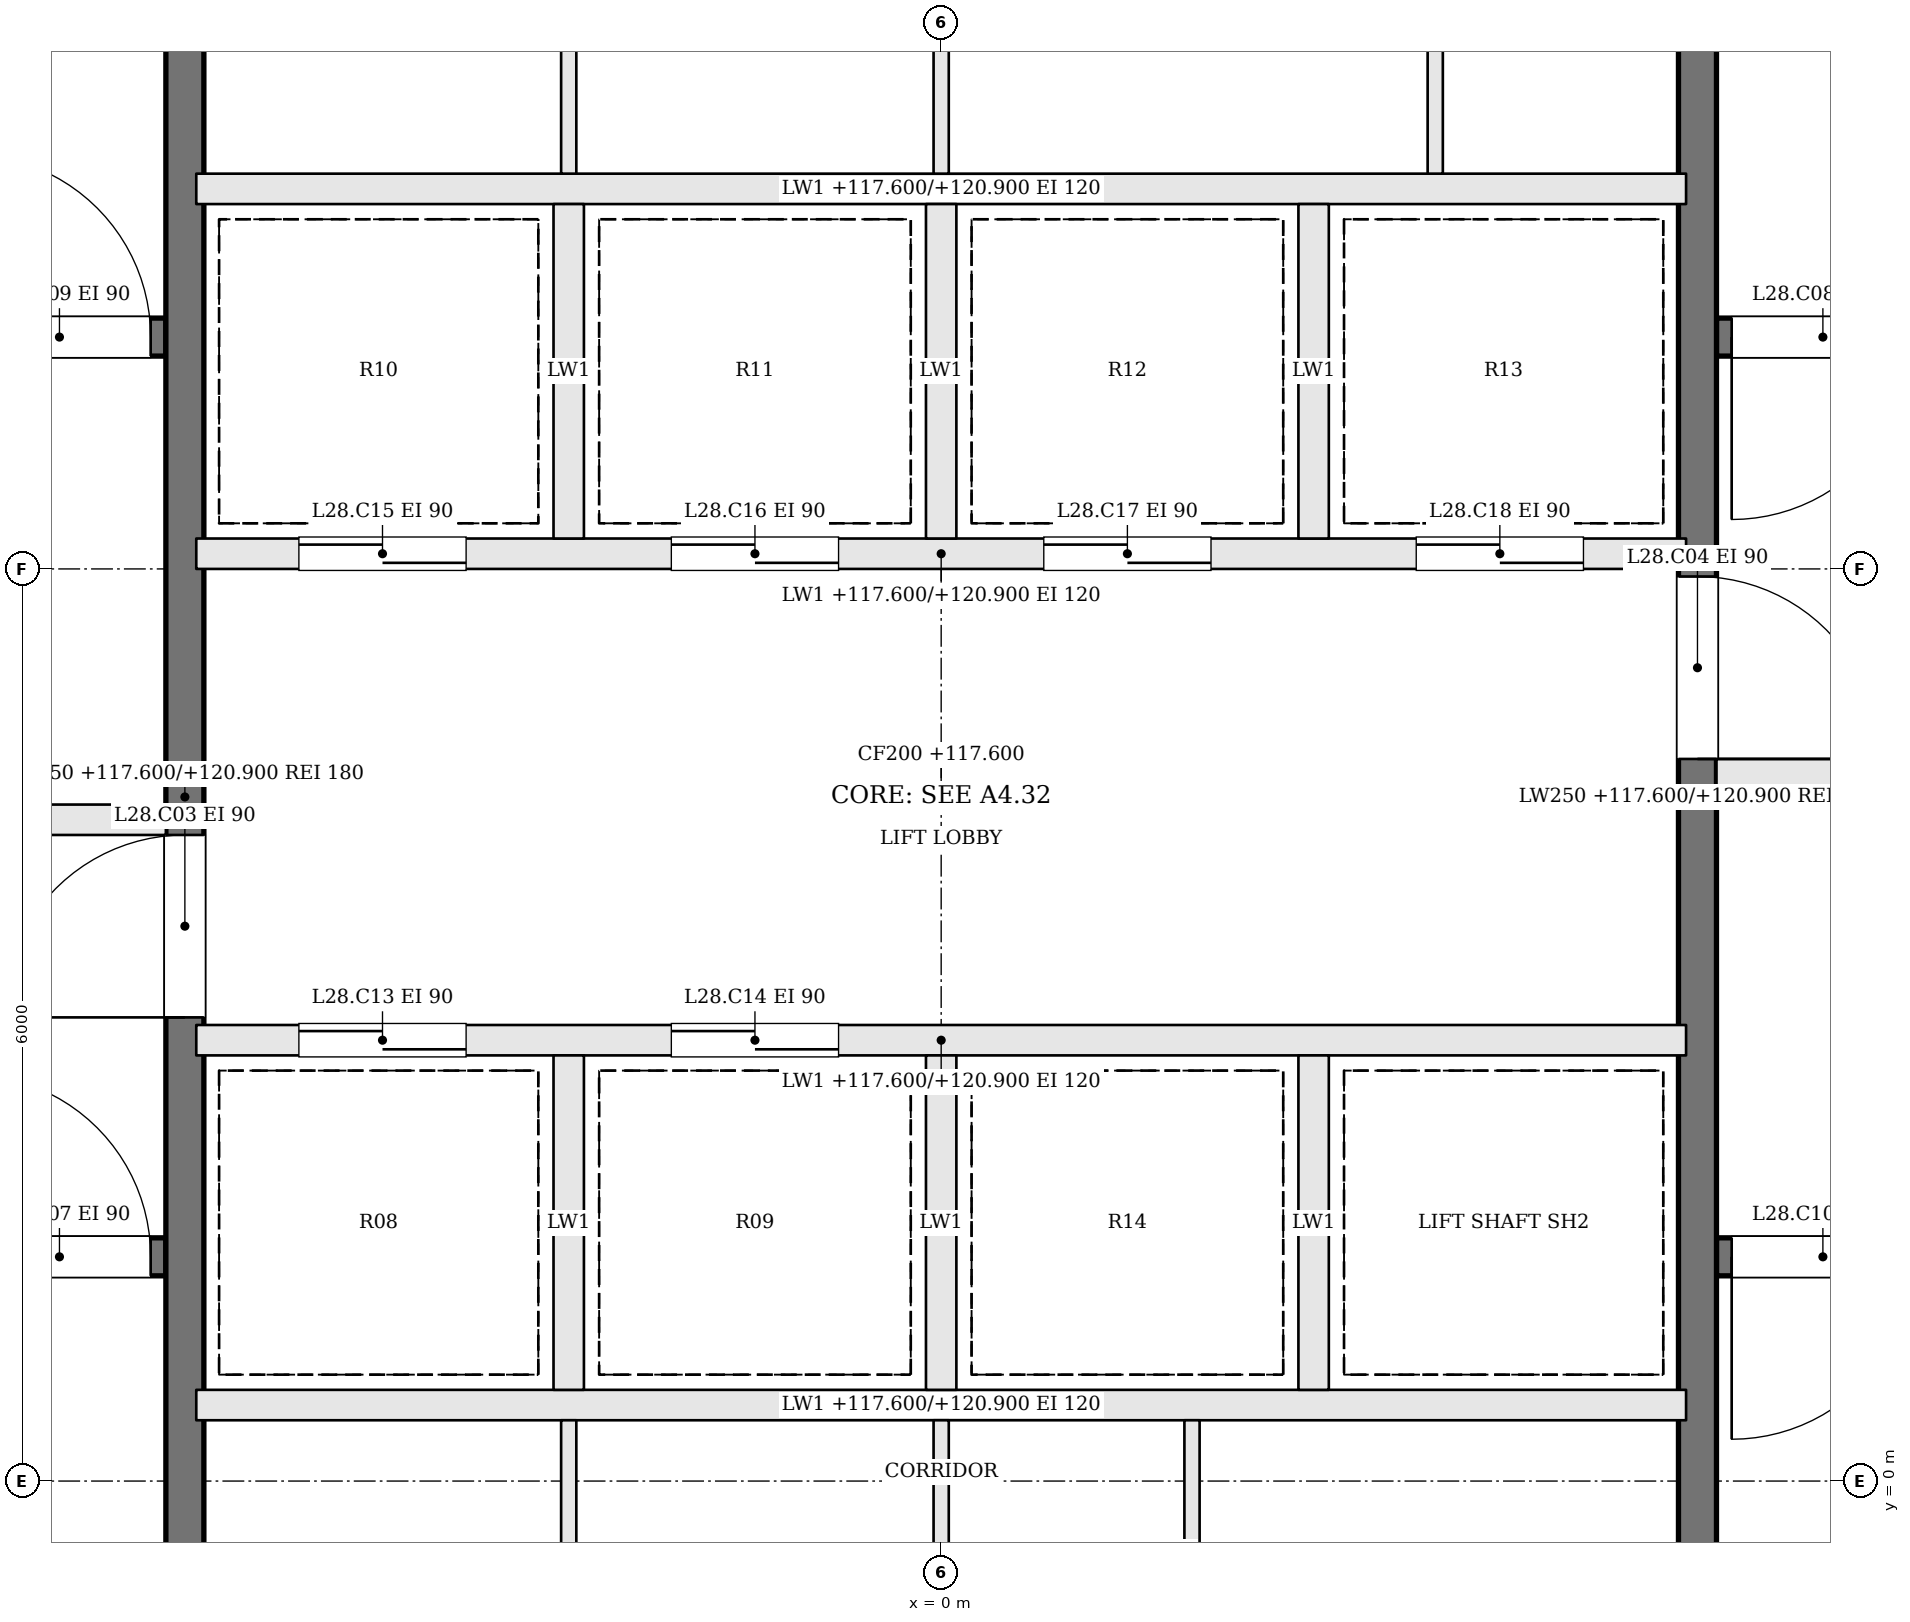
"""IFC4 building model, lengths in metres.
Left out: names, types, materials, properties, quantities, classifications, styles, units other than length and angle.
Written with IfcOpenShell. Run it as: python <this file> out.ifc"""

import sys

from ifc_helpers import new_model, si_unit, direction, frame, frame_2d, origin, place, context, subcontext, project, spatial, rectangle, extrude, element, fill, save


model = new_model("IFC4")
c1 = context("Model", 3, precision=1e-05, world=origin(), true_north=direction((0.0, 1.0)))
c2 = subcontext(c1, "Body", "Model", "MODEL_VIEW")
j1 = project(units=[si_unit("LENGTHUNIT", "METRE"), si_unit("PLANEANGLEUNIT", "RADIAN")], contexts=[c1])
p1 = place(None, origin())
s1 = spatial("IfcSite", under=j1, at=p1, CompositionType="ELEMENT")
p2 = place(p1, origin())
s2 = spatial("IfcBuilding", under=s1, at=p2, CompositionType="ELEMENT")
p3 = place(p2, frame((0.0, 0.0, 117.6)))
s3 = spatial("IfcBuildingStorey", under=s2, at=p3, CompositionType="ELEMENT", Elevation=117.6)
p4 = place(p3, frame((-11.9, 1.475, 0.0), z_axis=(0.0, 0.0, 1.0), x_axis=(1.0, 0.0, 0.0)))
e1 = element("IfcWall", 1, at=p4, inside=s3, PredefinedType="SOLIDWALL", context=c2, shape_type="SweptSolid", body=[
    extrude(rectangle(XDim=6.8, YDim=0.25, at=frame_2d((3.4, 0.0))), origin(), (0.0, 0.0, 1.0), 3.3),
])
p5 = place(p4, frame((5.5, 0.0, 0.0)))
e2 = element("IfcOpeningElement", 2, at=p5, cuts=e1, PredefinedType="OPENING", context=c2, shape_type="SweptSolid", body=[
    extrude(rectangle(XDim=1.2, YDim=2.1, at=frame_2d((0.6, 1.05))), frame((0.0, 0.135, 0.0), z_axis=(0.0, -1.0, 0.0), x_axis=(1.0, 0.0, 0.0)), (0.0, 0.0, 1.0), 0.27),
])
p6 = place(p3, frame((11.9, 7.525, 0.0), z_axis=(0.0, 0.0, 1.0), x_axis=(-1.0, 0.0, 0.0)))
e3 = element("IfcWall", 3, at=p6, inside=s3, PredefinedType="SOLIDWALL", context=c2, shape_type="SweptSolid", body=[
    extrude(rectangle(XDim=6.8, YDim=0.25, at=frame_2d((3.4, 0.0))), origin(), (0.0, 0.0, 1.0), 3.3),
])
p7 = place(p6, frame((5.5, 0.0, 0.0)))
e4 = element("IfcOpeningElement", 4, at=p7, cuts=e3, PredefinedType="OPENING", context=c2, shape_type="SweptSolid", body=[
    extrude(rectangle(XDim=1.2, YDim=2.1, at=frame_2d((0.6, 1.05))), frame((0.0, 0.135, 0.0), z_axis=(0.0, -1.0, 0.0), x_axis=(1.0, 0.0, 0.0)), (0.0, 0.0, 1.0), 0.27),
])
p8 = place(p3, frame((-11.9, 4.35, 0.0), z_axis=(0.0, 0.0, 1.0), x_axis=(1.0, 0.0, 0.0)))
e5 = element("IfcWall", 5, at=p8, inside=s3, PredefinedType="SOLIDWALL", context=c2, shape_type="SweptSolid", body=[
    extrude(rectangle(XDim=6.8, YDim=0.2, at=frame_2d((3.4, 0.0))), origin(), (0.0, 0.0, 1.0), 3.3),
])
p9 = place(p8, frame((4.1, 0.0, 0.0)))
e6 = element("IfcOpeningElement", 6, at=p9, cuts=e5, PredefinedType="OPENING", context=c2, shape_type="SweptSolid", body=[
    extrude(rectangle(XDim=1.2, YDim=2.1, at=frame_2d((0.6, 1.05))), frame((0.0, 0.11, 0.0), z_axis=(0.0, -1.0, 0.0), x_axis=(1.0, 0.0, 0.0)), (0.0, 0.0, 1.0), 0.22),
])
p10 = place(p8, frame((0.8, 0.0, 0.0)))
e7 = element("IfcOpeningElement", 7, at=p10, cuts=e5, PredefinedType="OPENING", context=c2, shape_type="SweptSolid", body=[
    extrude(rectangle(XDim=1.2, YDim=2.1, at=frame_2d((0.6, 1.05))), frame((0.0, 0.11, 0.0), z_axis=(0.0, -1.0, 0.0), x_axis=(1.0, 0.0, 0.0)), (0.0, 0.0, 1.0), 0.22),
])
p11 = place(p3, frame((11.9, 4.65, 0.0), z_axis=(0.0, 0.0, 1.0), x_axis=(-1.0, 0.0, 0.0)))
e8 = element("IfcWall", 8, at=p11, inside=s3, PredefinedType="SOLIDWALL", context=c2, shape_type="SweptSolid", body=[
    extrude(rectangle(XDim=6.8, YDim=0.2, at=frame_2d((3.4, 0.0))), origin(), (0.0, 0.0, 1.0), 3.3),
])
p12 = place(p11, frame((4.1, 0.0, 0.0)))
e9 = element("IfcOpeningElement", 9, at=p12, cuts=e8, PredefinedType="OPENING", context=c2, shape_type="SweptSolid", body=[
    extrude(rectangle(XDim=1.2, YDim=2.1, at=frame_2d((0.6, 1.05))), frame((0.0, 0.11, 0.0), z_axis=(0.0, -1.0, 0.0), x_axis=(1.0, 0.0, 0.0)), (0.0, 0.0, 1.0), 0.22),
])
p13 = place(p11, frame((0.8, 0.0, 0.0)))
e10 = element("IfcOpeningElement", 10, at=p13, cuts=e8, PredefinedType="OPENING", context=c2, shape_type="SweptSolid", body=[
    extrude(rectangle(XDim=1.2, YDim=2.1, at=frame_2d((0.6, 1.05))), frame((0.0, 0.11, 0.0), z_axis=(0.0, -1.0, 0.0), x_axis=(1.0, 0.0, 0.0)), (0.0, 0.0, 1.0), 0.22),
])
p14 = place(p3, frame((-11.9, 7.525, 0.0), z_axis=(0.0, 0.0, 1.0), x_axis=(1.0, 0.0, 0.0)))
e11 = element("IfcWall", 11, at=p14, inside=s3, PredefinedType="SOLIDWALL", context=c2, shape_type="SweptSolid", body=[
    extrude(rectangle(XDim=6.8, YDim=0.25, at=frame_2d((3.4, 0.0))), origin(), (0.0, 0.0, 1.0), 3.3),
])
p15 = place(p14, frame((5.5, 0.0, 0.0)))
e12 = element("IfcOpeningElement", 12, at=p15, cuts=e11, PredefinedType="OPENING", context=c2, shape_type="SweptSolid", body=[
    extrude(rectangle(XDim=1.2, YDim=2.1, at=frame_2d((0.6, 1.05))), frame((0.0, 0.135, 0.0), z_axis=(0.0, -1.0, 0.0), x_axis=(1.0, 0.0, 0.0)), (0.0, 0.0, 1.0), 0.27),
])
p16 = place(p3, frame((11.9, 1.475, 0.0), z_axis=(0.0, 0.0, 1.0), x_axis=(-1.0, 0.0, 0.0)))
e13 = element("IfcWall", 13, at=p16, inside=s3, PredefinedType="SOLIDWALL", context=c2, shape_type="SweptSolid", body=[
    extrude(rectangle(XDim=6.8, YDim=0.25, at=frame_2d((3.4, 0.0))), origin(), (0.0, 0.0, 1.0), 3.3),
])
p17 = place(p16, frame((5.5, 0.0, 0.0)))
e14 = element("IfcOpeningElement", 14, at=p17, cuts=e13, PredefinedType="OPENING", context=c2, shape_type="SweptSolid", body=[
    extrude(rectangle(XDim=1.2, YDim=2.1, at=frame_2d((0.6, 1.05))), frame((0.0, 0.135, 0.0), z_axis=(0.0, -1.0, 0.0), x_axis=(1.0, 0.0, 0.0)), (0.0, 0.0, 1.0), 0.27),
])
p18 = place(p3, frame((-4.975, -1.9, 0.0), z_axis=(0.0, 0.0, 1.0), x_axis=(0.0, 1.0, 0.0)))
e15 = element("IfcWall", 15, at=p18, inside=s3, PredefinedType="SOLIDWALL", context=c2, shape_type="SweptSolid", body=[
    extrude(rectangle(XDim=12.8, YDim=0.25, at=frame_2d((6.4, 0.0))), origin(), (0.0, 0.0, 1.0), 3.3),
])
p19 = place(p18, frame((4.95, 0.0, 0.0)))
e16 = element("IfcOpeningElement", 16, at=p19, cuts=e15, PredefinedType="OPENING", context=c2, shape_type="SweptSolid", body=[
    extrude(rectangle(XDim=1.2, YDim=2.1, at=frame_2d((0.6, 1.05))), frame((0.0, 0.135, 0.0), z_axis=(0.0, -1.0, 0.0), x_axis=(1.0, 0.0, 0.0)), (0.0, 0.0, 1.0), 0.27),
])
p20 = place(p3, frame((4.975, 10.9, 0.0), z_axis=(0.0, 0.0, 1.0), x_axis=(0.0, -1.0, 0.0)))
e17 = element("IfcWall", 17, at=p20, inside=s3, PredefinedType="SOLIDWALL", context=c2, shape_type="SweptSolid", body=[
    extrude(rectangle(XDim=12.8, YDim=0.25, at=frame_2d((6.4, 0.0))), origin(), (0.0, 0.0, 1.0), 3.3),
])
p21 = place(p20, frame((4.95, 0.0, 0.0)))
e18 = element("IfcOpeningElement", 18, at=p21, cuts=e17, PredefinedType="OPENING", context=c2, shape_type="SweptSolid", body=[
    extrude(rectangle(XDim=1.2, YDim=2.1, at=frame_2d((0.6, 1.05))), frame((0.0, 0.135, 0.0), z_axis=(0.0, -1.0, 0.0), x_axis=(1.0, 0.0, 0.0)), (0.0, 0.0, 1.0), 0.27),
])
p22 = place(p3, frame((-4.9, 0.5, 0.0), z_axis=(0.0, 0.0, 1.0), x_axis=(1.0, 0.0, 0.0)))
e19 = element("IfcWall", 19, at=p22, inside=s3, PredefinedType="SOLIDWALL", context=c2, shape_type="SweptSolid", body=[
    extrude(rectangle(XDim=9.8, YDim=0.2, at=frame_2d((4.9, 0.0))), origin(), (0.0, 0.0, 1.0), 3.3),
])
p23 = place(p3, frame((-4.9, 2.9, 0.0), z_axis=(0.0, 0.0, 1.0), x_axis=(1.0, 0.0, 0.0)))
e20 = element("IfcWall", 20, at=p23, inside=s3, PredefinedType="SOLIDWALL", context=c2, shape_type="SweptSolid", body=[
    extrude(rectangle(XDim=9.8, YDim=0.2, at=frame_2d((4.9, 0.0))), origin(), (0.0, 0.0, 1.0), 3.3),
])
p24 = place(p23, frame((0.675, 0.0, 0.0)))
e21 = element("IfcOpeningElement", 21, at=p24, cuts=e20, PredefinedType="OPENING", context=c2, shape_type="SweptSolid", body=[
    extrude(rectangle(XDim=1.1, YDim=2.1, at=frame_2d((0.55, 1.05))), frame((0.0, 0.11, 0.0), z_axis=(0.0, -1.0, 0.0), x_axis=(1.0, 0.0, 0.0)), (0.0, 0.0, 1.0), 0.22),
])
p25 = place(p23, frame((3.125, 0.0, 0.0)))
e22 = element("IfcOpeningElement", 22, at=p25, cuts=e20, PredefinedType="OPENING", context=c2, shape_type="SweptSolid", body=[
    extrude(rectangle(XDim=1.1, YDim=2.1, at=frame_2d((0.55, 1.05))), frame((0.0, 0.11, 0.0), z_axis=(0.0, -1.0, 0.0), x_axis=(1.0, 0.0, 0.0)), (0.0, 0.0, 1.0), 0.22),
])
p26 = place(p3, frame((-4.9, 6.1, 0.0), z_axis=(0.0, 0.0, 1.0), x_axis=(1.0, 0.0, 0.0)))
e23 = element("IfcWall", 23, at=p26, inside=s3, PredefinedType="SOLIDWALL", context=c2, shape_type="SweptSolid", body=[
    extrude(rectangle(XDim=9.8, YDim=0.2, at=frame_2d((4.9, 0.0))), origin(), (0.0, 0.0, 1.0), 3.3),
])
p27 = place(p26, frame((0.675, 0.0, 0.0)))
e24 = element("IfcOpeningElement", 24, at=p27, cuts=e23, PredefinedType="OPENING", context=c2, shape_type="SweptSolid", body=[
    extrude(rectangle(XDim=1.1, YDim=2.1, at=frame_2d((0.55, 1.05))), frame((0.0, 0.11, 0.0), z_axis=(0.0, -1.0, 0.0), x_axis=(1.0, 0.0, 0.0)), (0.0, 0.0, 1.0), 0.22),
])
p28 = place(p26, frame((3.125, 0.0, 0.0)))
e25 = element("IfcOpeningElement", 25, at=p28, cuts=e23, PredefinedType="OPENING", context=c2, shape_type="SweptSolid", body=[
    extrude(rectangle(XDim=1.1, YDim=2.1, at=frame_2d((0.55, 1.05))), frame((0.0, 0.11, 0.0), z_axis=(0.0, -1.0, 0.0), x_axis=(1.0, 0.0, 0.0)), (0.0, 0.0, 1.0), 0.22),
])
p29 = place(p26, frame((5.575, 0.0, 0.0)))
e26 = element("IfcOpeningElement", 26, at=p29, cuts=e23, PredefinedType="OPENING", context=c2, shape_type="SweptSolid", body=[
    extrude(rectangle(XDim=1.1, YDim=2.1, at=frame_2d((0.55, 1.05))), frame((0.0, 0.11, 0.0), z_axis=(0.0, -1.0, 0.0), x_axis=(1.0, 0.0, 0.0)), (0.0, 0.0, 1.0), 0.22),
])
p30 = place(p26, frame((8.025, 0.0, 0.0)))
e27 = element("IfcOpeningElement", 27, at=p30, cuts=e23, PredefinedType="OPENING", context=c2, shape_type="SweptSolid", body=[
    extrude(rectangle(XDim=1.1, YDim=2.1, at=frame_2d((0.55, 1.05))), frame((0.0, 0.11, 0.0), z_axis=(0.0, -1.0, 0.0), x_axis=(1.0, 0.0, 0.0)), (0.0, 0.0, 1.0), 0.22),
])
p31 = place(p3, frame((-4.9, 8.5, 0.0), z_axis=(0.0, 0.0, 1.0), x_axis=(1.0, 0.0, 0.0)))
e28 = element("IfcWall", 28, at=p31, inside=s3, PredefinedType="SOLIDWALL", context=c2, shape_type="SweptSolid", body=[
    extrude(rectangle(XDim=9.8, YDim=0.2, at=frame_2d((4.9, 0.0))), origin(), (0.0, 0.0, 1.0), 3.3),
])
for number, where, z_axis, x_axis in (
    (29, (-2.45, 0.6, 0.0), (0.0, 0.0, 1.0), (0.0, 1.0, 0.0)),
    (30, (0.0, 0.6, 0.0), (0.0, 0.0, 1.0), (0.0, 1.0, 0.0)),
    (31, (2.45, 0.6, 0.0), (0.0, 0.0, 1.0), (0.0, 1.0, 0.0)),
    (32, (-2.45, 6.2, 0.0), (0.0, 0.0, 1.0), (0.0, 1.0, 0.0)),
    (33, (0.0, 6.2, 0.0), (0.0, 0.0, 1.0), (0.0, 1.0, 0.0)),
    (34, (2.45, 6.2, 0.0), (0.0, 0.0, 1.0), (0.0, 1.0, 0.0)),
):
    element("IfcWall", number, at=place(p3, frame(where, z_axis=z_axis, x_axis=x_axis)), inside=s3, PredefinedType="SOLIDWALL", context=c2, shape_type="SweptSolid", body=[
        extrude(rectangle(XDim=2.2, YDim=0.2, at=frame_2d((1.1, 0.0))), origin(), (0.0, 0.0, 1.0), 3.3),
    ])
for number, where, z_axis, x_axis in (
    (35, (-2.45, -1.9, 0.0), (0.0, 0.0, 1.0), (0.0, 1.0, 0.0)),
    (36, (0.0, -1.9, 0.0), (0.0, 0.0, 1.0), (0.0, 1.0, 0.0)),
    (37, (1.65, -1.9, 0.0), (0.0, 0.0, 1.0), (0.0, 1.0, 0.0)),
    (38, (-2.45, 8.6, 0.0), (0.0, 0.0, 1.0), (0.0, 1.0, 0.0)),
    (39, (0.0, 8.6, 0.0), (0.0, 0.0, 1.0), (0.0, 1.0, 0.0)),
    (40, (3.25, 8.6, 0.0), (0.0, 0.0, 1.0), (0.0, 1.0, 0.0)),
):
    element("IfcWall", number, at=place(p3, frame(where, z_axis=z_axis, x_axis=x_axis)), inside=s3, PredefinedType="PARTITIONING", context=c2, shape_type="SweptSolid", body=[
        extrude(rectangle(XDim=2.3, YDim=0.1, at=frame_2d((1.15, 0.0))), origin(), (0.0, 0.0, 1.0), 3.3),
    ])
p32 = place(p19, origin())
e41 = element("IfcDoor", 41, at=p32, inside=s3, OperationType="SINGLE_SWING_LEFT", PredefinedType="DOOR", context=c2, shape_type="SweptSolid", body=[
    extrude(rectangle(XDim=1.2, YDim=2.1, at=frame_2d((0.6, 1.05))), frame((0.0, 0.025, 0.0), z_axis=(0.0, -1.0, 0.0), x_axis=(1.0, 0.0, 0.0)), (0.0, 0.0, 1.0), 0.05),
])
fill(e16, e41)
p33 = place(p21, origin())
e42 = element("IfcDoor", 42, at=p33, inside=s3, OperationType="SINGLE_SWING_RIGHT", PredefinedType="DOOR", context=c2, shape_type="SweptSolid", body=[
    extrude(rectangle(XDim=1.2, YDim=2.1, at=frame_2d((0.6, 1.05))), frame((0.0, 0.025, 0.0), z_axis=(0.0, -1.0, 0.0), x_axis=(1.0, 0.0, 0.0)), (0.0, 0.0, 1.0), 0.05),
])
fill(e18, e42)
p34 = place(p5, origin())
e43 = element("IfcDoor", 43, at=p34, inside=s3, OperationType="SINGLE_SWING_LEFT", PredefinedType="DOOR", context=c2, shape_type="SweptSolid", body=[
    extrude(rectangle(XDim=1.2, YDim=2.1, at=frame_2d((0.6, 1.05))), frame((0.0, 0.025, 0.0), z_axis=(0.0, -1.0, 0.0), x_axis=(1.0, 0.0, 0.0)), (0.0, 0.0, 1.0), 0.05),
])
fill(e2, e43)
p35 = place(p7, origin())
e44 = element("IfcDoor", 44, at=p35, inside=s3, OperationType="SINGLE_SWING_RIGHT", PredefinedType="DOOR", context=c2, shape_type="SweptSolid", body=[
    extrude(rectangle(XDim=1.2, YDim=2.1, at=frame_2d((0.6, 1.05))), frame((0.0, 0.025, 0.0), z_axis=(0.0, -1.0, 0.0), x_axis=(1.0, 0.0, 0.0)), (0.0, 0.0, 1.0), 0.05),
])
fill(e4, e44)
p36 = place(p15, origin())
e45 = element("IfcDoor", 45, at=p36, inside=s3, OperationType="SINGLE_SWING_LEFT", PredefinedType="DOOR", context=c2, shape_type="SweptSolid", body=[
    extrude(rectangle(XDim=1.2, YDim=2.1, at=frame_2d((0.6, 1.05))), frame((0.0, 0.025, 0.0), z_axis=(0.0, -1.0, 0.0), x_axis=(1.0, 0.0, 0.0)), (0.0, 0.0, 1.0), 0.05),
])
fill(e12, e45)
p37 = place(p17, origin())
e46 = element("IfcDoor", 46, at=p37, inside=s3, OperationType="SINGLE_SWING_RIGHT", PredefinedType="DOOR", context=c2, shape_type="SweptSolid", body=[
    extrude(rectangle(XDim=1.2, YDim=2.1, at=frame_2d((0.6, 1.05))), frame((0.0, 0.025, 0.0), z_axis=(0.0, -1.0, 0.0), x_axis=(1.0, 0.0, 0.0)), (0.0, 0.0, 1.0), 0.05),
])
fill(e14, e46)
p38 = place(p24, origin())
e47 = element("IfcDoor", 47, at=p38, inside=s3, OperationType="SLIDING_TO_RIGHT", PredefinedType="DOOR", context=c2, shape_type="SweptSolid", body=[
    extrude(rectangle(XDim=1.1, YDim=2.1, at=frame_2d((0.55, 1.05))), frame((0.0, 0.025, 0.0), z_axis=(0.0, -1.0, 0.0), x_axis=(1.0, 0.0, 0.0)), (0.0, 0.0, 1.0), 0.05),
])
fill(e21, e47)
p39 = place(p25, origin())
e48 = element("IfcDoor", 48, at=p39, inside=s3, OperationType="SLIDING_TO_LEFT", PredefinedType="DOOR", context=c2, shape_type="SweptSolid", body=[
    extrude(rectangle(XDim=1.1, YDim=2.1, at=frame_2d((0.55, 1.05))), frame((0.0, 0.025, 0.0), z_axis=(0.0, -1.0, 0.0), x_axis=(1.0, 0.0, 0.0)), (0.0, 0.0, 1.0), 0.05),
])
fill(e22, e48)
p40 = place(p27, origin())
e49 = element("IfcDoor", 49, at=p40, inside=s3, OperationType="SLIDING_TO_RIGHT", PredefinedType="DOOR", context=c2, shape_type="SweptSolid", body=[
    extrude(rectangle(XDim=1.1, YDim=2.1, at=frame_2d((0.55, 1.05))), frame((0.0, 0.025, 0.0), z_axis=(0.0, -1.0, 0.0), x_axis=(1.0, 0.0, 0.0)), (0.0, 0.0, 1.0), 0.05),
])
fill(e24, e49)
p41 = place(p28, origin())
e50 = element("IfcDoor", 50, at=p41, inside=s3, OperationType="SLIDING_TO_LEFT", PredefinedType="DOOR", context=c2, shape_type="SweptSolid", body=[
    extrude(rectangle(XDim=1.1, YDim=2.1, at=frame_2d((0.55, 1.05))), frame((0.0, 0.025, 0.0), z_axis=(0.0, -1.0, 0.0), x_axis=(1.0, 0.0, 0.0)), (0.0, 0.0, 1.0), 0.05),
])
fill(e25, e50)
p42 = place(p29, origin())
e51 = element("IfcDoor", 51, at=p42, inside=s3, OperationType="SLIDING_TO_RIGHT", PredefinedType="DOOR", context=c2, shape_type="SweptSolid", body=[
    extrude(rectangle(XDim=1.1, YDim=2.1, at=frame_2d((0.55, 1.05))), frame((0.0, 0.025, 0.0), z_axis=(0.0, -1.0, 0.0), x_axis=(1.0, 0.0, 0.0)), (0.0, 0.0, 1.0), 0.05),
])
fill(e26, e51)
p43 = place(p30, origin())
e52 = element("IfcDoor", 52, at=p43, inside=s3, OperationType="SLIDING_TO_LEFT", PredefinedType="DOOR", context=c2, shape_type="SweptSolid", body=[
    extrude(rectangle(XDim=1.1, YDim=2.1, at=frame_2d((0.55, 1.05))), frame((0.0, 0.025, 0.0), z_axis=(0.0, -1.0, 0.0), x_axis=(1.0, 0.0, 0.0)), (0.0, 0.0, 1.0), 0.05),
])
fill(e27, e52)
save(model, sys.argv[1])
